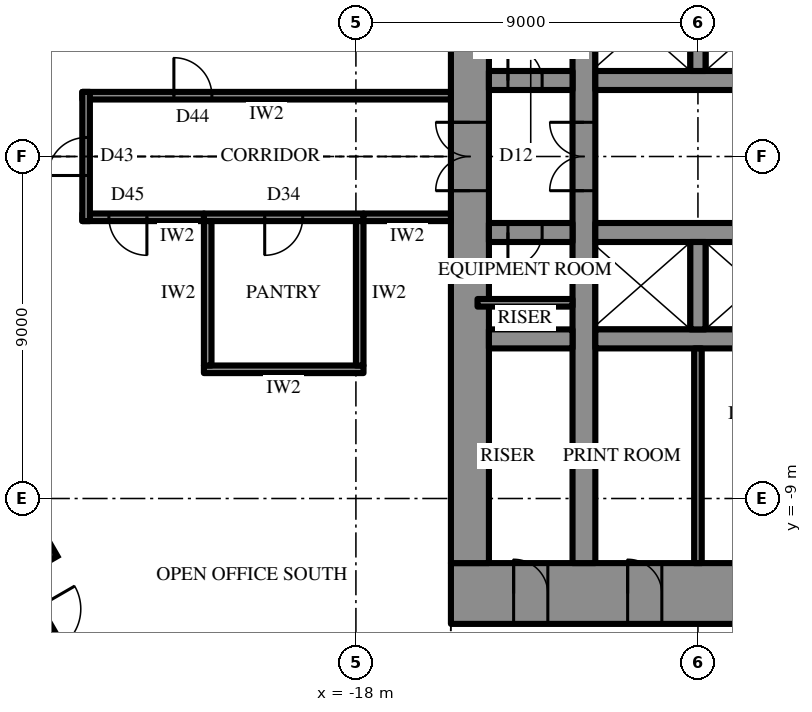
"""IFC4 building model, lengths in metres.
Left out: names, types, materials, properties, quantities, classifications, styles, units other than length and angle.
Written with IfcOpenShell. Run it as: python <this file> out.ifc"""

import sys

from ifc_helpers import new_model, si_unit, direction, frame, frame_2d, origin, origin_2d, place, context, subcontext, project, spatial, rectangle, extrude, element, fill, save


model = new_model("IFC4")
c1 = context("Model", 3, precision=1e-05, world=origin(), true_north=direction((0.0, 1.0)))
c2 = subcontext(c1, "Body", "Model", "MODEL_VIEW")
j1 = project(units=[si_unit("LENGTHUNIT", "METRE"), si_unit("PLANEANGLEUNIT", "RADIAN")], contexts=[c1])
p1 = place(None, origin())
s1 = spatial("IfcSite", under=j1, at=p1, CompositionType="ELEMENT")
p2 = place(p1, origin())
s2 = spatial("IfcBuilding", under=s1, at=p2, CompositionType="ELEMENT")
p3 = place(p2, frame((0.0, 0.0, 232.3)))
s3 = spatial("IfcBuildingStorey", under=s2, at=p3, CompositionType="ELEMENT", Elevation=232.3)
p4 = place(p3, frame((-26.861, -10.175, 0.0), z_axis=(0.0, 0.0, 1.0), x_axis=(0.5, -0.866025403784, 0.0)))
e1 = element("IfcColumn", 1, at=p4, inside=s3, PredefinedType="COLUMN", context=c2, shape_type="SweptSolid", body=[
    extrude(rectangle(XDim=1.6, YDim=1.4, at=origin_2d()), origin(), (0.0, 0.0, 1.0), 4.2),
])
p5 = place(p3, frame((15.5, -11.5, 0.0), z_axis=(0.0, 0.0, 1.0), x_axis=(-1.0, 0.0, 0.0)))
e2 = element("IfcWall", 2, at=p5, inside=s3, PredefinedType="SHEAR", context=c2, shape_type="SweptSolid", body=[
    extrude(rectangle(XDim=31.0, YDim=1.6, at=frame_2d((15.5, 0.0))), origin(), (0.0, 0.0, 1.0), 4.2),
])
p6 = place(p5, frame((16.35, 0.0, 0.0)))
e3 = element("IfcOpeningElement", 3, at=p6, cuts=e2, PredefinedType="OPENING", context=c2, shape_type="SweptSolid", body=[
    extrude(rectangle(XDim=0.9, YDim=2.2, at=frame_2d((0.45, 1.1))), frame((0.0, 0.81, 0.0), z_axis=(0.0, -1.0, 0.0), x_axis=(1.0, 0.0, 0.0)), (0.0, 0.0, 1.0), 1.62),
])
p7 = place(p5, frame((19.35, 0.0, 0.0)))
e4 = element("IfcOpeningElement", 4, at=p7, cuts=e2, PredefinedType="OPENING", context=c2, shape_type="SweptSolid", body=[
    extrude(rectangle(XDim=0.9, YDim=2.2, at=frame_2d((0.45, 1.1))), frame((0.0, 0.81, 0.0), z_axis=(0.0, -1.0, 0.0), x_axis=(1.0, 0.0, 0.0)), (0.0, 0.0, 1.0), 1.62),
])
p8 = place(p5, frame((22.4, 0.0, 0.0)))
e5 = element("IfcOpeningElement", 5, at=p8, cuts=e2, PredefinedType="OPENING", context=c2, shape_type="SweptSolid", body=[
    extrude(rectangle(XDim=1.0, YDim=2.2, at=frame_2d((0.5, 1.1))), frame((0.0, 0.81, 0.0), z_axis=(0.0, -1.0, 0.0), x_axis=(1.0, 0.0, 0.0)), (0.0, 0.0, 1.0), 1.62),
])
p9 = place(p5, frame((1.65, 0.0, 0.0)))
e6 = element("IfcOpeningElement", 6, at=p9, cuts=e2, PredefinedType="OPENING", context=c2, shape_type="SweptSolid", body=[
    extrude(rectangle(XDim=0.9, YDim=2.2, at=frame_2d((0.45, 1.1))), frame((0.0, 0.81, 0.0), z_axis=(0.0, -1.0, 0.0), x_axis=(1.0, 0.0, 0.0)), (0.0, 0.0, 1.0), 1.62),
])
p10 = place(p5, frame((4.65, 0.0, 0.0)))
e7 = element("IfcOpeningElement", 7, at=p10, cuts=e2, PredefinedType="OPENING", context=c2, shape_type="SweptSolid", body=[
    extrude(rectangle(XDim=0.9, YDim=2.2, at=frame_2d((0.45, 1.1))), frame((0.0, 0.81, 0.0), z_axis=(0.0, -1.0, 0.0), x_axis=(1.0, 0.0, 0.0)), (0.0, 0.0, 1.0), 1.62),
])
p11 = place(p5, frame((25.45, 0.0, 0.0)))
e8 = element("IfcOpeningElement", 8, at=p11, cuts=e2, PredefinedType="OPENING", context=c2, shape_type="SweptSolid", body=[
    extrude(rectangle(XDim=0.9, YDim=2.2, at=frame_2d((0.45, 1.1))), frame((0.0, 0.81, 0.0), z_axis=(0.0, -1.0, 0.0), x_axis=(1.0, 0.0, 0.0)), (0.0, 0.0, 1.0), 1.62),
])
p12 = place(p5, frame((28.45, 0.0, 0.0)))
e9 = element("IfcOpeningElement", 9, at=p12, cuts=e2, PredefinedType="OPENING", context=c2, shape_type="SweptSolid", body=[
    extrude(rectangle(XDim=0.9, YDim=2.2, at=frame_2d((0.45, 1.1))), frame((0.0, 0.81, 0.0), z_axis=(0.0, -1.0, 0.0), x_axis=(1.0, 0.0, 0.0)), (0.0, 0.0, 1.0), 1.62),
])
p13 = place(p3, frame((-15.0, 10.7, 0.0), z_axis=(0.0, 0.0, 1.0), x_axis=(0.0, -1.0, 0.0)))
e10 = element("IfcWall", 10, at=p13, inside=s3, PredefinedType="SHEAR", context=c2, shape_type="SweptSolid", body=[
    extrude(rectangle(XDim=21.4, YDim=1.0, at=frame_2d((10.7, 0.0))), origin(), (0.0, 0.0, 1.0), 4.2),
])
p14 = place(p13, frame((9.8, 0.0, 0.0)))
e11 = element("IfcOpeningElement", 11, at=p14, cuts=e10, PredefinedType="OPENING", context=c2, shape_type="SweptSolid", body=[
    extrude(rectangle(XDim=1.8, YDim=2.4, at=frame_2d((0.9, 1.2))), frame((0.0, 0.51, 0.0), z_axis=(0.0, -1.0, 0.0), x_axis=(1.0, 0.0, 0.0)), (0.0, 0.0, 1.0), 1.02),
])
p15 = place(p3, frame((-12.0, -10.7, 0.0), z_axis=(0.0, 0.0, 1.0), x_axis=(0.0, 1.0, 0.0)))
e12 = element("IfcWall", 12, at=p15, inside=s3, PredefinedType="SHEAR", context=c2, shape_type="SweptSolid", body=[
    extrude(rectangle(XDim=21.4, YDim=0.6, at=frame_2d((10.7, 0.0))), origin(), (0.0, 0.0, 1.0), 4.2),
])
p16 = place(p15, frame((9.8, 0.0, 0.0)))
e13 = element("IfcOpeningElement", 13, at=p16, cuts=e12, PredefinedType="OPENING", context=c2, shape_type="SweptSolid", body=[
    extrude(rectangle(XDim=1.8, YDim=2.4, at=frame_2d((0.9, 1.2))), frame((0.0, 0.31, 0.0), z_axis=(0.0, -1.0, 0.0), x_axis=(1.0, 0.0, 0.0)), (0.0, 0.0, 1.0), 0.62),
])
p17 = place(p3, frame((-14.5, 2.0, 0.0), z_axis=(0.0, 0.0, 1.0), x_axis=(1.0, 0.0, 0.0)))
e14 = element("IfcWall", 14, at=p17, inside=s3, PredefinedType="SHEAR", context=c2, shape_type="SweptSolid", body=[
    extrude(rectangle(XDim=2.2, YDim=0.5, at=frame_2d((1.1, 0.0))), origin(), (0.0, 0.0, 1.0), 4.2),
])
p18 = place(p17, frame((0.5, 0.0, 0.0)))
e15 = element("IfcOpeningElement", 15, at=p18, cuts=e14, PredefinedType="OPENING", context=c2, shape_type="SweptSolid", body=[
    extrude(rectangle(XDim=0.9, YDim=2.2, at=frame_2d((0.45, 1.1))), frame((0.0, 0.26, 0.0), z_axis=(0.0, -1.0, 0.0), x_axis=(1.0, 0.0, 0.0)), (0.0, 0.0, 1.0), 0.52),
])
p19 = place(p3, frame((-11.7, 2.0, 0.0), z_axis=(0.0, 0.0, 1.0), x_axis=(1.0, 0.0, 0.0)))
e16 = element("IfcWall", 16, at=p19, inside=s3, PredefinedType="SHEAR", context=c2, shape_type="SweptSolid", body=[
    extrude(rectangle(XDim=5.9, YDim=0.5, at=frame_2d((2.95, 0.0))), origin(), (0.0, 0.0, 1.0), 4.2),
])
p20 = place(p3, frame((-9.0, 2.25, 0.0), z_axis=(0.0, 0.0, 1.0), x_axis=(0.0, 1.0, 0.0)))
e17 = element("IfcWall", 17, at=p20, inside=s3, PredefinedType="SHEAR", context=c2, shape_type="SweptSolid", body=[
    extrude(rectangle(XDim=2.3, YDim=0.4, at=frame_2d((1.15, 0.0))), origin(), (0.0, 0.0, 1.0), 4.2),
])
p21 = place(p3, frame((3.2, -2.0, 0.0), z_axis=(0.0, 0.0, 1.0), x_axis=(-1.0, 0.0, 0.0)))
e18 = element("IfcWall", 18, at=p21, inside=s3, PredefinedType="SHEAR", context=c2, shape_type="SweptSolid", body=[
    extrude(rectangle(XDim=14.9, YDim=0.5, at=frame_2d((7.45, 0.0))), origin(), (0.0, 0.0, 1.0), 4.2),
])
p22 = place(p21, frame((1.15, 0.0, 0.0)))
e19 = element("IfcOpeningElement", 19, at=p22, cuts=e18, PredefinedType="OPENING", context=c2, shape_type="SweptSolid", body=[
    extrude(rectangle(XDim=1.1, YDim=2.2, at=frame_2d((0.55, 1.1))), frame((0.0, 0.26, 0.0), z_axis=(0.0, -1.0, 0.0), x_axis=(1.0, 0.0, 0.0)), (0.0, 0.0, 1.0), 0.52),
])
p23 = place(p21, frame((4.15, 0.0, 0.0)))
e20 = element("IfcOpeningElement", 20, at=p23, cuts=e18, PredefinedType="OPENING", context=c2, shape_type="SweptSolid", body=[
    extrude(rectangle(XDim=1.1, YDim=2.2, at=frame_2d((0.55, 1.1))), frame((0.0, 0.26, 0.0), z_axis=(0.0, -1.0, 0.0), x_axis=(1.0, 0.0, 0.0)), (0.0, 0.0, 1.0), 0.52),
])
p24 = place(p21, frame((7.15, 0.0, 0.0)))
e21 = element("IfcOpeningElement", 21, at=p24, cuts=e18, PredefinedType="OPENING", context=c2, shape_type="SweptSolid", body=[
    extrude(rectangle(XDim=1.1, YDim=2.2, at=frame_2d((0.55, 1.1))), frame((0.0, 0.26, 0.0), z_axis=(0.0, -1.0, 0.0), x_axis=(1.0, 0.0, 0.0)), (0.0, 0.0, 1.0), 0.52),
])
p25 = place(p21, frame((10.15, 0.0, 0.0)))
e22 = element("IfcOpeningElement", 22, at=p25, cuts=e18, PredefinedType="OPENING", context=c2, shape_type="SweptSolid", body=[
    extrude(rectangle(XDim=1.1, YDim=2.2, at=frame_2d((0.55, 1.1))), frame((0.0, 0.26, 0.0), z_axis=(0.0, -1.0, 0.0), x_axis=(1.0, 0.0, 0.0)), (0.0, 0.0, 1.0), 0.52),
])
p26 = place(p3, frame((-12.3, -2.0, 0.0), z_axis=(0.0, 0.0, 1.0), x_axis=(-1.0, 0.0, 0.0)))
e23 = element("IfcWall", 23, at=p26, inside=s3, PredefinedType="SHEAR", context=c2, shape_type="SweptSolid", body=[
    extrude(rectangle(XDim=2.2, YDim=0.5, at=frame_2d((1.1, 0.0))), origin(), (0.0, 0.0, 1.0), 4.2),
])
p27 = place(p26, frame((0.8, 0.0, 0.0)))
e24 = element("IfcOpeningElement", 24, at=p27, cuts=e23, PredefinedType="OPENING", context=c2, shape_type="SweptSolid", body=[
    extrude(rectangle(XDim=0.9, YDim=2.2, at=frame_2d((0.45, 1.1))), frame((0.0, 0.26, 0.0), z_axis=(0.0, -1.0, 0.0), x_axis=(1.0, 0.0, 0.0)), (0.0, 0.0, 1.0), 0.52),
])
p28 = place(p3, frame((11.7, -4.8, 0.0), z_axis=(0.0, 0.0, 1.0), x_axis=(-1.0, 0.0, 0.0)))
e25 = element("IfcWall", 25, at=p28, inside=s3, PredefinedType="SHEAR", context=c2, shape_type="SweptSolid", body=[
    extrude(rectangle(XDim=23.4, YDim=0.5, at=frame_2d((11.7, 0.0))), origin(), (0.0, 0.0, 1.0), 4.2),
])
p29 = place(p28, frame((6.6, 0.0, 0.0)))
e26 = element("IfcOpeningElement", 26, at=p29, cuts=e25, PredefinedType="OPENING", context=c2, shape_type="SweptSolid", body=[
    extrude(rectangle(XDim=1.2, YDim=2.2, at=frame_2d((0.6, 1.1))), frame((0.0, 0.26, 0.0), z_axis=(0.0, -1.0, 0.0), x_axis=(1.0, 0.0, 0.0)), (0.0, 0.0, 1.0), 0.52),
])
p30 = place(p28, frame((3.6, 0.0, 0.0)))
e27 = element("IfcOpeningElement", 27, at=p30, cuts=e25, PredefinedType="OPENING", context=c2, shape_type="SweptSolid", body=[
    extrude(rectangle(XDim=1.2, YDim=2.2, at=frame_2d((0.6, 1.1))), frame((0.0, 0.26, 0.0), z_axis=(0.0, -1.0, 0.0), x_axis=(1.0, 0.0, 0.0)), (0.0, 0.0, 1.0), 0.52),
])
p31 = place(p3, frame((-12.3, -4.8, 0.0), z_axis=(0.0, 0.0, 1.0), x_axis=(-1.0, 0.0, 0.0)))
e28 = element("IfcWall", 28, at=p31, inside=s3, PredefinedType="SHEAR", context=c2, shape_type="SweptSolid", body=[
    extrude(rectangle(XDim=2.2, YDim=0.5, at=frame_2d((1.1, 0.0))), origin(), (0.0, 0.0, 1.0), 4.2),
])
p32 = place(p3, frame((-9.0, -2.25, 0.0), z_axis=(0.0, 0.0, 1.0), x_axis=(0.0, -1.0, 0.0)))
e29 = element("IfcWall", 29, at=p32, inside=s3, PredefinedType="SHEAR", context=c2, shape_type="SweptSolid", body=[
    extrude(rectangle(XDim=2.3, YDim=0.4, at=frame_2d((1.15, 0.0))), origin(), (0.0, 0.0, 1.0), 4.2),
])
p33 = place(p3, frame((-31.263, -3.551, 0.0), z_axis=(0.0, 0.0, 1.0), x_axis=(0.500000442367, -0.866025148383, 0.0)))
e30 = element("IfcWall", 30, at=p33, inside=s3, PredefinedType="SOLIDWALL", context=c2, shape_type="SweptSolid", body=[
    extrude(rectangle(XDim=25.113, YDim=0.3, at=frame_2d((12.556, 0.0))), origin(), (0.0, 0.0, 1.0), 2.8),
])
p34 = place(p33, frame((4.278, 0.0, 0.6)))
e31 = element("IfcOpeningElement", 31, at=p34, cuts=e30, PredefinedType="OPENING", context=c2, shape_type="SweptSolid", body=[
    extrude(rectangle(XDim=2.7, YDim=1.95, at=frame_2d((1.35, 0.975))), frame((0.0, 0.16, 0.0), z_axis=(0.0, -1.0, 0.0), x_axis=(1.0, 0.0, 0.0)), (0.0, 0.0, 1.0), 0.32),
])
p35 = place(p33, frame((9.647, 0.0, 0.0)))
e32 = element("IfcOpeningElement", 32, at=p35, cuts=e30, PredefinedType="OPENING", context=c2, shape_type="SweptSolid", body=[
    extrude(rectangle(XDim=1.2, YDim=2.4, at=frame_2d((0.6, 1.2))), frame((0.0, 0.16, 0.0), z_axis=(0.0, -1.0, 0.0), x_axis=(1.0, 0.0, 0.0)), (0.0, 0.0, 1.0), 0.32),
])
p36 = place(p33, frame((13.516, 0.0, 0.6)))
e33 = element("IfcOpeningElement", 33, at=p36, cuts=e30, PredefinedType="OPENING", context=c2, shape_type="SweptSolid", body=[
    extrude(rectangle(XDim=2.7, YDim=1.95, at=frame_2d((1.35, 0.975))), frame((0.0, 0.16, 0.0), z_axis=(0.0, -1.0, 0.0), x_axis=(1.0, 0.0, 0.0)), (0.0, 0.0, 1.0), 0.32),
])
p37 = place(p33, frame((18.135, 0.0, 0.6)))
e34 = element("IfcOpeningElement", 34, at=p37, cuts=e30, PredefinedType="OPENING", context=c2, shape_type="SweptSolid", body=[
    extrude(rectangle(XDim=2.7, YDim=1.95, at=frame_2d((1.35, 0.975))), frame((0.0, 0.16, 0.0), z_axis=(0.0, -1.0, 0.0), x_axis=(1.0, 0.0, 0.0)), (0.0, 0.0, 1.0), 0.32),
])
p38 = place(p3, frame((-9.0, -5.05, 0.0), z_axis=(0.0, 0.0, 1.0), x_axis=(0.0, -1.0, 0.0)))
e35 = element("IfcWall", 35, at=p38, inside=s3, PredefinedType="PARTITIONING", context=c2, shape_type="SweptSolid", body=[
    extrude(rectangle(XDim=5.65, YDim=0.2, at=frame_2d((2.825, 0.0))), origin(), (0.0, 0.0, 1.0), 4.0),
])
p39 = place(p3, frame((-12.3, -3.85, 0.0), z_axis=(0.0, 0.0, 1.0), x_axis=(-1.0, 0.0, 0.0)))
e36 = element("IfcWall", 36, at=p39, inside=s3, PredefinedType="PARTITIONING", context=c2, shape_type="SweptSolid", body=[
    extrude(rectangle(XDim=2.5, YDim=0.2, at=frame_2d((1.25, 0.0))), origin(), (0.0, 0.0, 1.0), 4.0),
])
p40 = place(p3, frame((-17.8, -1.6, 0.0), z_axis=(0.0, 0.0, 1.0), x_axis=(-1.0, 0.0, 0.0)))
e37 = element("IfcWall", 37, at=p40, inside=s3, PredefinedType="PARTITIONING", context=c2, shape_type="SweptSolid", body=[
    extrude(rectangle(XDim=4.2, YDim=0.2, at=frame_2d((2.1, 0.0))), origin(), (0.0, 0.0, 1.0), 4.0),
])
p41 = place(p40, frame((1.6, 0.0, 0.0)))
e38 = element("IfcOpeningElement", 38, at=p41, cuts=e37, PredefinedType="OPENING", context=c2, shape_type="SweptSolid", body=[
    extrude(rectangle(XDim=1.0, YDim=2.2, at=frame_2d((0.5, 1.1))), frame((0.0, 0.11, 0.0), z_axis=(0.0, -1.0, 0.0), x_axis=(1.0, 0.0, 0.0)), (0.0, 0.0, 1.0), 0.22),
])
p42 = place(p3, frame((-17.8, -5.6, 0.0), z_axis=(0.0, 0.0, 1.0), x_axis=(-1.0, 0.0, 0.0)))
e39 = element("IfcWall", 39, at=p42, inside=s3, PredefinedType="PARTITIONING", context=c2, shape_type="SweptSolid", body=[
    extrude(rectangle(XDim=4.2, YDim=0.2, at=frame_2d((2.1, 0.0))), origin(), (0.0, 0.0, 1.0), 4.0),
])
for number, where, z_axis, x_axis in (
    (40, (-17.9, -1.7, 0.0), (0.0, 0.0, 1.0), (0.0, -1.0, 0.0)),
    (41, (-21.9, -1.7, 0.0), (0.0, 0.0, 1.0), (0.0, -1.0, 0.0)),
):
    element("IfcWall", number, at=place(p3, frame(where, z_axis=z_axis, x_axis=x_axis)), inside=s3, PredefinedType="PARTITIONING", context=c2, shape_type="SweptSolid", body=[
        extrude(rectangle(XDim=3.8, YDim=0.2, at=frame_2d((1.9, 0.0))), origin(), (0.0, 0.0, 1.0), 4.0),
    ])
p43 = place(p3, frame((-15.5, 1.6, 0.0), z_axis=(0.0, 0.0, 1.0), x_axis=(-1.0, 0.0, 0.0)))
e42 = element("IfcWall", 42, at=p43, inside=s3, PredefinedType="PARTITIONING", context=c2, shape_type="SweptSolid", body=[
    extrude(rectangle(XDim=9.7, YDim=0.2, at=frame_2d((4.85, 0.0))), origin(), (0.0, 0.0, 1.0), 4.0),
])
p44 = place(p43, frame((6.29, 0.0, 0.0)))
e43 = element("IfcOpeningElement", 43, at=p44, cuts=e42, PredefinedType="OPENING", context=c2, shape_type="SweptSolid", body=[
    extrude(rectangle(XDim=1.0, YDim=2.2, at=frame_2d((0.5, 1.1))), frame((0.0, 0.11, 0.0), z_axis=(0.0, -1.0, 0.0), x_axis=(1.0, 0.0, 0.0)), (0.0, 0.0, 1.0), 0.22),
])
p45 = place(p3, frame((-22.0, -1.6, 0.0), z_axis=(0.0, 0.0, 1.0), x_axis=(-1.0, 0.0, 0.0)))
e44 = element("IfcWall", 44, at=p45, inside=s3, PredefinedType="PARTITIONING", context=c2, shape_type="SweptSolid", body=[
    extrude(rectangle(XDim=3.2, YDim=0.2, at=frame_2d((1.6, 0.0))), origin(), (0.0, 0.0, 1.0), 4.0),
])
p46 = place(p45, frame((1.5, 0.0, 0.0)))
e45 = element("IfcOpeningElement", 45, at=p46, cuts=e44, PredefinedType="OPENING", context=c2, shape_type="SweptSolid", body=[
    extrude(rectangle(XDim=1.0, YDim=2.2, at=frame_2d((0.5, 1.1))), frame((0.0, 0.11, 0.0), z_axis=(0.0, -1.0, 0.0), x_axis=(1.0, 0.0, 0.0)), (0.0, 0.0, 1.0), 0.22),
])
p47 = place(p3, frame((-15.5, -1.6, 0.0), z_axis=(0.0, 0.0, 1.0), x_axis=(-1.0, 0.0, 0.0)))
e46 = element("IfcWall", 46, at=p47, inside=s3, PredefinedType="PARTITIONING", context=c2, shape_type="SweptSolid", body=[
    extrude(rectangle(XDim=2.3, YDim=0.2, at=frame_2d((1.15, 0.0))), origin(), (0.0, 0.0, 1.0), 4.0),
])
p48 = place(p3, frame((-25.1, -1.7, 0.0), z_axis=(0.0, 0.0, 1.0), x_axis=(0.0, 1.0, 0.0)))
e47 = element("IfcWall", 47, at=p48, inside=s3, PredefinedType="PARTITIONING", context=c2, shape_type="SweptSolid", body=[
    extrude(rectangle(XDim=3.4, YDim=0.2, at=frame_2d((1.7, 0.0))), origin(), (0.0, 0.0, 1.0), 4.0),
])
p49 = place(p48, frame((1.2, 0.0, 0.0)))
e48 = element("IfcOpeningElement", 48, at=p49, cuts=e47, PredefinedType="OPENING", context=c2, shape_type="SweptSolid", body=[
    extrude(rectangle(XDim=1.0, YDim=2.2, at=frame_2d((0.5, 1.1))), frame((0.0, 0.11, 0.0), z_axis=(0.0, -1.0, 0.0), x_axis=(1.0, 0.0, 0.0)), (0.0, 0.0, 1.0), 0.22),
])
p50 = place(p35, origin())
e49 = element("IfcDoor", 49, at=p50, inside=s3, OperationType="SINGLE_SWING_RIGHT", PredefinedType="DOOR", context=c2, shape_type="SweptSolid", body=[
    extrude(rectangle(XDim=1.2, YDim=2.4, at=frame_2d((0.6, 1.2))), frame((0.0, 0.025, 0.0), z_axis=(0.0, -1.0, 0.0), x_axis=(1.0, 0.0, 0.0)), (0.0, 0.0, 1.0), 0.05),
])
fill(e32, e49)
p51 = place(p14, frame((1.8, 0.0, 0.0), z_axis=(0.0, 0.0, 1.0), x_axis=(-1.0, 0.0, 0.0)))
e50 = element("IfcDoor", 50, at=p51, inside=s3, OperationType="DOUBLE_DOOR_SINGLE_SWING", PredefinedType="DOOR", context=c2, shape_type="SweptSolid", body=[
    extrude(rectangle(XDim=1.8, YDim=2.4, at=frame_2d((0.9, 1.2))), frame((0.0, 0.025, 0.0), z_axis=(0.0, -1.0, 0.0), x_axis=(1.0, 0.0, 0.0)), (0.0, 0.0, 1.0), 0.05),
])
fill(e11, e50)
p52 = place(p11, frame((0.9, 0.0, 0.0), z_axis=(0.0, 0.0, 1.0), x_axis=(-1.0, 0.0, 0.0)))
e51 = element("IfcDoor", 51, at=p52, inside=s3, OperationType="SINGLE_SWING_RIGHT", PredefinedType="DOOR", context=c2, shape_type="SweptSolid", body=[
    extrude(rectangle(XDim=0.9, YDim=2.2, at=frame_2d((0.45, 1.1))), frame((0.0, 0.025, 0.0), z_axis=(0.0, -1.0, 0.0), x_axis=(1.0, 0.0, 0.0)), (0.0, 0.0, 1.0), 0.05),
])
fill(e8, e51)
p53 = place(p12, frame((0.9, 0.0, 0.0), z_axis=(0.0, 0.0, 1.0), x_axis=(-1.0, 0.0, 0.0)))
e52 = element("IfcDoor", 52, at=p53, inside=s3, OperationType="SINGLE_SWING_RIGHT", PredefinedType="DOOR", context=c2, shape_type="SweptSolid", body=[
    extrude(rectangle(XDim=0.9, YDim=2.2, at=frame_2d((0.45, 1.1))), frame((0.0, 0.025, 0.0), z_axis=(0.0, -1.0, 0.0), x_axis=(1.0, 0.0, 0.0)), (0.0, 0.0, 1.0), 0.05),
])
fill(e9, e52)
p54 = place(p18, origin())
e53 = element("IfcDoor", 53, at=p54, inside=s3, OperationType="SINGLE_SWING_RIGHT", PredefinedType="DOOR", context=c2, shape_type="SweptSolid", body=[
    extrude(rectangle(XDim=0.9, YDim=2.2, at=frame_2d((0.45, 1.1))), frame((0.0, 0.025, 0.0), z_axis=(0.0, -1.0, 0.0), x_axis=(1.0, 0.0, 0.0)), (0.0, 0.0, 1.0), 0.05),
])
fill(e15, e53)
p55 = place(p27, origin())
e54 = element("IfcDoor", 54, at=p55, inside=s3, OperationType="SINGLE_SWING_LEFT", PredefinedType="DOOR", context=c2, shape_type="SweptSolid", body=[
    extrude(rectangle(XDim=0.9, YDim=2.2, at=frame_2d((0.45, 1.1))), frame((0.0, 0.025, 0.0), z_axis=(0.0, -1.0, 0.0), x_axis=(1.0, 0.0, 0.0)), (0.0, 0.0, 1.0), 0.05),
])
fill(e24, e54)
p56 = place(p16, origin())
e55 = element("IfcDoor", 55, at=p56, inside=s3, OperationType="DOUBLE_DOOR_SINGLE_SWING", PredefinedType="DOOR", context=c2, shape_type="SweptSolid", body=[
    extrude(rectangle(XDim=1.8, YDim=2.4, at=frame_2d((0.9, 1.2))), frame((0.0, 0.025, 0.0), z_axis=(0.0, -1.0, 0.0), x_axis=(1.0, 0.0, 0.0)), (0.0, 0.0, 1.0), 0.05),
])
fill(e13, e55)
p57 = place(p41, origin())
e56 = element("IfcDoor", 56, at=p57, inside=s3, OperationType="SINGLE_SWING_LEFT", PredefinedType="DOOR", context=c2, shape_type="SweptSolid", body=[
    extrude(rectangle(XDim=1.0, YDim=2.2, at=frame_2d((0.5, 1.1))), frame((0.0, 0.025, 0.0), z_axis=(0.0, -1.0, 0.0), x_axis=(1.0, 0.0, 0.0)), (0.0, 0.0, 1.0), 0.05),
])
fill(e38, e56)
p58 = place(p44, frame((1.0, 0.0, 0.0), z_axis=(0.0, 0.0, 1.0), x_axis=(-1.0, 0.0, 0.0)))
e57 = element("IfcDoor", 57, at=p58, inside=s3, OperationType="SINGLE_SWING_RIGHT", PredefinedType="DOOR", context=c2, shape_type="SweptSolid", body=[
    extrude(rectangle(XDim=1.0, YDim=2.2, at=frame_2d((0.5, 1.1))), frame((0.0, 0.025, 0.0), z_axis=(0.0, -1.0, 0.0), x_axis=(1.0, 0.0, 0.0)), (0.0, 0.0, 1.0), 0.05),
])
fill(e43, e57)
p59 = place(p46, origin())
e58 = element("IfcDoor", 58, at=p59, inside=s3, OperationType="SINGLE_SWING_RIGHT", PredefinedType="DOOR", context=c2, shape_type="SweptSolid", body=[
    extrude(rectangle(XDim=1.0, YDim=2.2, at=frame_2d((0.5, 1.1))), frame((0.0, 0.025, 0.0), z_axis=(0.0, -1.0, 0.0), x_axis=(1.0, 0.0, 0.0)), (0.0, 0.0, 1.0), 0.05),
])
fill(e45, e58)
p60 = place(p49, origin())
e59 = element("IfcDoor", 59, at=p60, inside=s3, OperationType="SINGLE_SWING_RIGHT", PredefinedType="DOOR", context=c2, shape_type="SweptSolid", body=[
    extrude(rectangle(XDim=1.0, YDim=2.2, at=frame_2d((0.5, 1.1))), frame((0.0, 0.025, 0.0), z_axis=(0.0, -1.0, 0.0), x_axis=(1.0, 0.0, 0.0)), (0.0, 0.0, 1.0), 0.05),
])
fill(e48, e59)
save(model, sys.argv[1])
